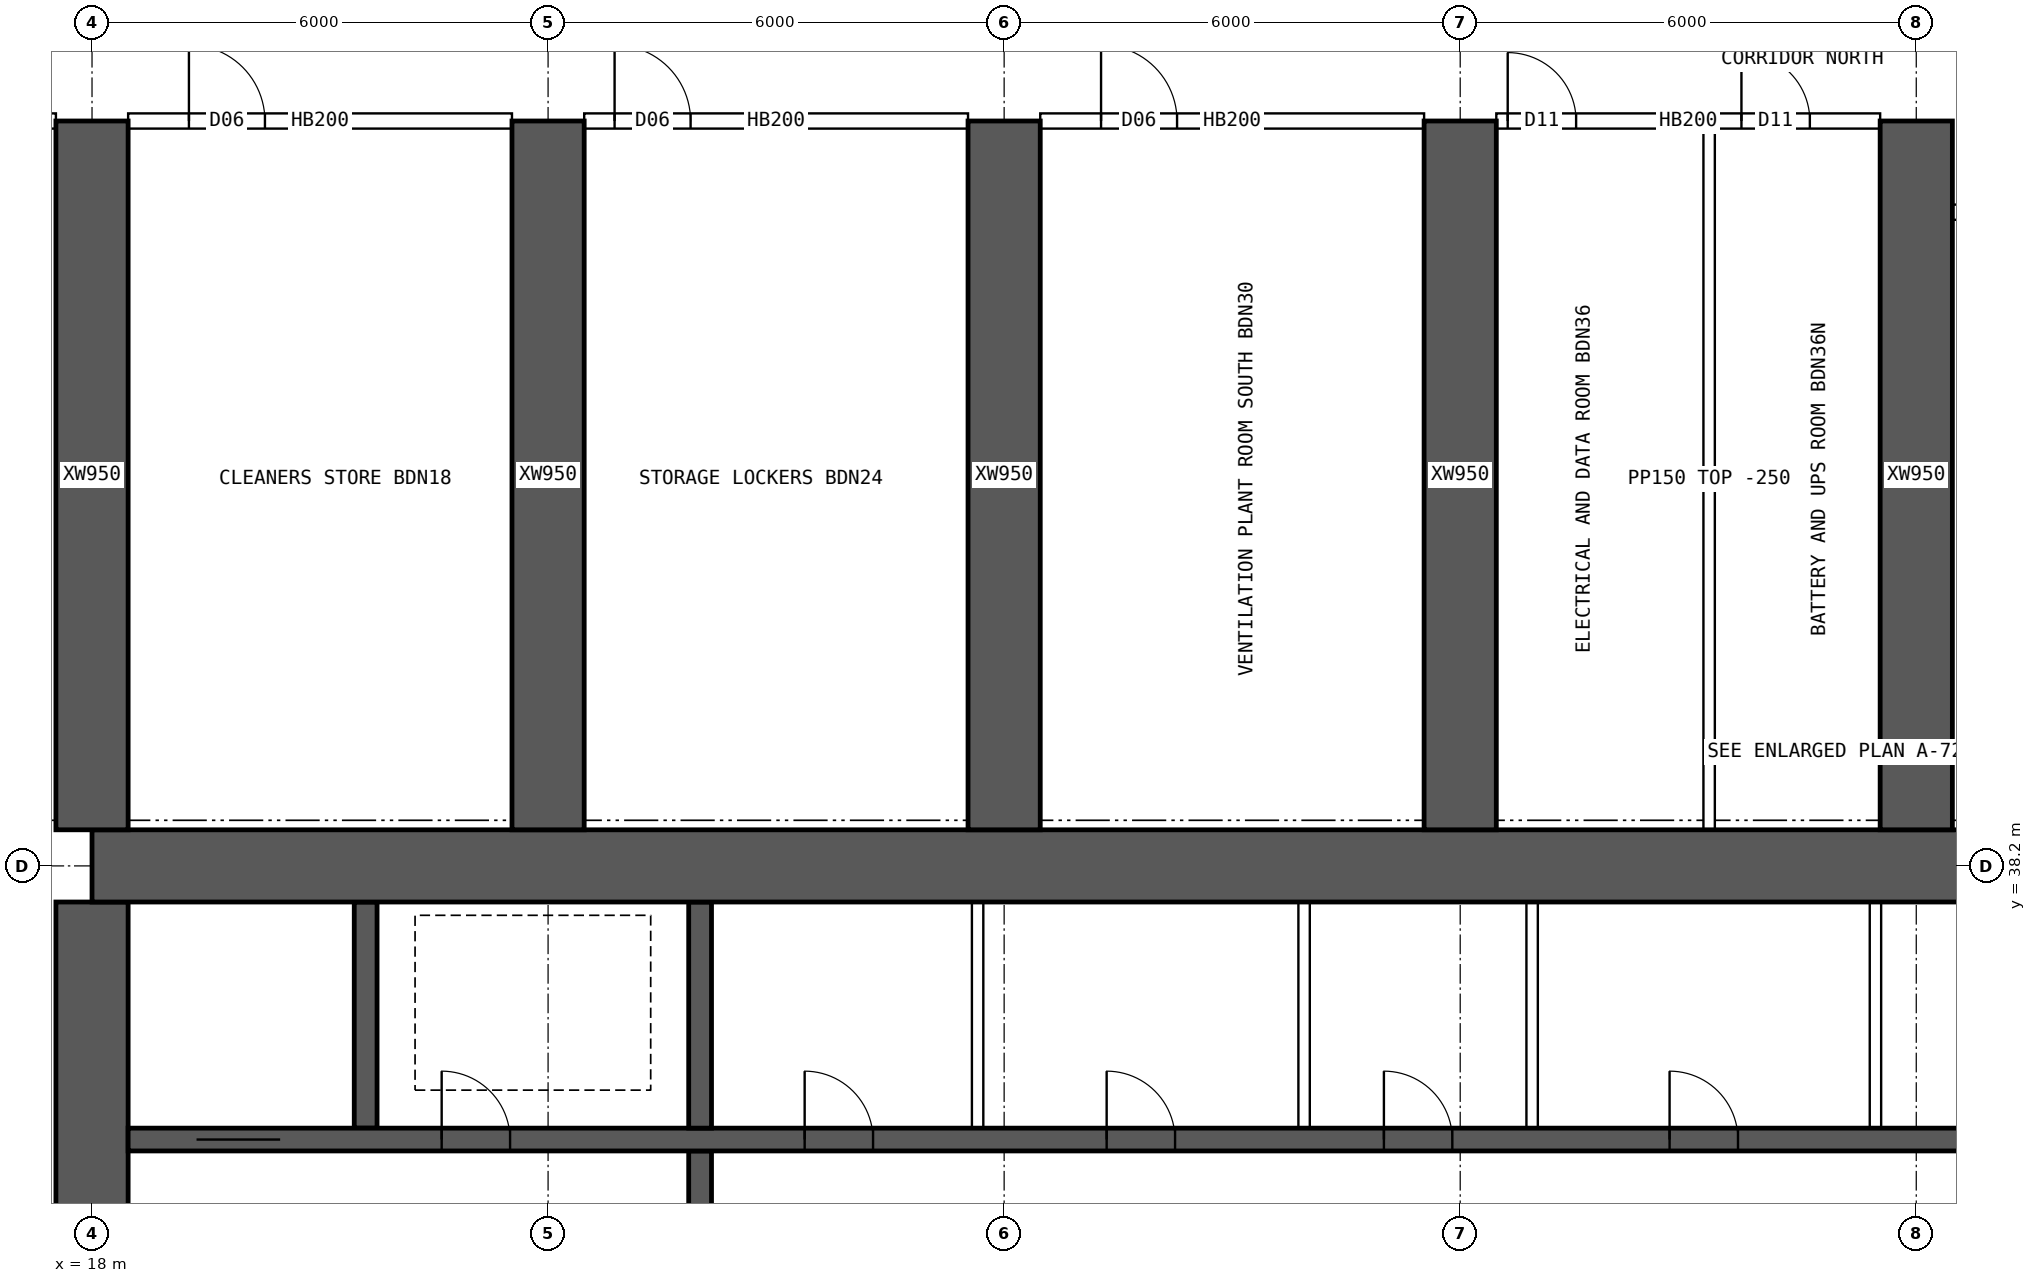
"""IFC4 building model, lengths in metres.
Left out: names, types, materials, properties, quantities, classifications, styles, units other than length and angle.
Written with IfcOpenShell. Run it as: python <this file> out.ifc"""

import sys

from ifc_helpers import new_model, si_unit, direction, frame, frame_2d, origin, place, context, subcontext, project, spatial, rectangle, extrude, element, fill, save


model = new_model("IFC4")
c1 = context("Model", 3, precision=1e-05, world=origin(), true_north=direction((0.0, 1.0)))
c2 = subcontext(c1, "Body", "Model", "MODEL_VIEW")
j1 = project(units=[si_unit("LENGTHUNIT", "METRE"), si_unit("PLANEANGLEUNIT", "RADIAN")], contexts=[c1])
p1 = place(None, origin())
s1 = spatial("IfcSite", under=j1, at=p1, CompositionType="ELEMENT")
p2 = place(p1, origin())
s2 = spatial("IfcBuilding", under=s1, at=p2, CompositionType="ELEMENT")
p3 = place(p2, frame((0.0, 0.0, 88.15)))
s3 = spatial("IfcBuildingStorey", under=s2, at=p3, CompositionType="ELEMENT", Elevation=88.15)
p4 = place(p3, frame((18.0, 38.2, 0.0), z_axis=(0.0, 0.0, 1.0), x_axis=(1.0, 0.0, 0.0)))
e1 = element("IfcWall", 1, at=p4, inside=s3, PredefinedType="SHEAR", context=c2, shape_type="SweptSolid", body=[
    extrude(rectangle(XDim=48.0, YDim=0.95, at=frame_2d((24.0, 0.0))), origin(), (0.0, 0.0, 1.0), 3.75),
])
p5 = place(p3, frame((18.0, 26.275, 0.0), z_axis=(0.0, 0.0, 1.0), x_axis=(0.0, 1.0, 0.0)))
e2 = element("IfcWall", 2, at=p5, inside=s3, PredefinedType="SHEAR", context=c2, shape_type="SweptSolid", body=[
    extrude(rectangle(XDim=11.45, YDim=0.95, at=frame_2d((5.725, 0.0))), origin(), (0.0, 0.0, 1.0), 3.75),
])
p6 = place(p5, frame((5.025, 0.0, 0.0)))
e3 = element("IfcOpeningElement", 3, at=p6, cuts=e2, PredefinedType="OPENING", context=c2, shape_type="SweptSolid", body=[
    extrude(rectangle(XDim=1.2, YDim=2.1, at=frame_2d((0.6, 1.05))), frame((0.0, 0.485, 0.0), z_axis=(0.0, -1.0, 0.0), x_axis=(1.0, 0.0, 0.0)), (0.0, 0.0, 1.0), 0.97),
])
p7 = place(p3, frame((18.475, 34.6, 0.0), z_axis=(0.0, 0.0, 1.0), x_axis=(1.0, 0.0, 0.0)))
e4 = element("IfcWall", 4, at=p7, inside=s3, PredefinedType="SHEAR", context=c2, shape_type="SweptSolid", body=[
    extrude(rectangle(XDim=47.05, YDim=0.3, at=frame_2d((23.525, 0.0))), origin(), (0.0, 0.0, 1.0), 3.75),
])
p8 = place(p7, frame((0.9, 0.0, 0.0)))
e5 = element("IfcOpeningElement", 5, at=p8, cuts=e4, PredefinedType="OPENING", context=c2, shape_type="SweptSolid", body=[
    extrude(rectangle(XDim=1.1, YDim=2.1, at=frame_2d((0.55, 1.05))), frame((0.0, 0.16, 0.0), z_axis=(0.0, -1.0, 0.0), x_axis=(1.0, 0.0, 0.0)), (0.0, 0.0, 1.0), 0.32),
])
p9 = place(p7, frame((45.05, 0.0, 0.0)))
e6 = element("IfcOpeningElement", 6, at=p9, cuts=e4, PredefinedType="OPENING", context=c2, shape_type="SweptSolid", body=[
    extrude(rectangle(XDim=1.1, YDim=2.1, at=frame_2d((0.55, 1.05))), frame((0.0, 0.16, 0.0), z_axis=(0.0, -1.0, 0.0), x_axis=(1.0, 0.0, 0.0)), (0.0, 0.0, 1.0), 0.32),
])
p10 = place(p7, frame((4.125, 0.0, 0.0)))
e7 = element("IfcOpeningElement", 7, at=p10, cuts=e4, PredefinedType="OPENING", context=c2, shape_type="SweptSolid", body=[
    extrude(rectangle(XDim=0.9, YDim=2.1, at=frame_2d((0.45, 1.05))), frame((0.0, 0.16, 0.0), z_axis=(0.0, -1.0, 0.0), x_axis=(1.0, 0.0, 0.0)), (0.0, 0.0, 1.0), 0.32),
])
p11 = place(p7, frame((42.025, 0.0, 0.0)))
e8 = element("IfcOpeningElement", 8, at=p11, cuts=e4, PredefinedType="OPENING", context=c2, shape_type="SweptSolid", body=[
    extrude(rectangle(XDim=0.9, YDim=2.1, at=frame_2d((0.45, 1.05))), frame((0.0, 0.16, 0.0), z_axis=(0.0, -1.0, 0.0), x_axis=(1.0, 0.0, 0.0)), (0.0, 0.0, 1.0), 0.32),
])
p12 = place(p7, frame((8.9, 0.0, 0.0)))
e9 = element("IfcOpeningElement", 9, at=p12, cuts=e4, PredefinedType="OPENING", context=c2, shape_type="SweptSolid", body=[
    extrude(rectangle(XDim=0.9, YDim=2.1, at=frame_2d((0.45, 1.05))), frame((0.0, 0.16, 0.0), z_axis=(0.0, -1.0, 0.0), x_axis=(1.0, 0.0, 0.0)), (0.0, 0.0, 1.0), 0.32),
])
p13 = place(p7, frame((12.874, 0.0, 0.0)))
e10 = element("IfcOpeningElement", 10, at=p13, cuts=e4, PredefinedType="OPENING", context=c2, shape_type="SweptSolid", body=[
    extrude(rectangle(XDim=0.9, YDim=2.1, at=frame_2d((0.45, 1.05))), frame((0.0, 0.16, 0.0), z_axis=(0.0, -1.0, 0.0), x_axis=(1.0, 0.0, 0.0)), (0.0, 0.0, 1.0), 0.32),
])
p14 = place(p7, frame((16.521, 0.0, 0.0)))
e11 = element("IfcOpeningElement", 11, at=p14, cuts=e4, PredefinedType="OPENING", context=c2, shape_type="SweptSolid", body=[
    extrude(rectangle(XDim=0.9, YDim=2.1, at=frame_2d((0.45, 1.05))), frame((0.0, 0.16, 0.0), z_axis=(0.0, -1.0, 0.0), x_axis=(1.0, 0.0, 0.0)), (0.0, 0.0, 1.0), 0.32),
])
p15 = place(p7, frame((20.28, 0.0, 0.0)))
e12 = element("IfcOpeningElement", 12, at=p15, cuts=e4, PredefinedType="OPENING", context=c2, shape_type="SweptSolid", body=[
    extrude(rectangle(XDim=0.9, YDim=2.1, at=frame_2d((0.45, 1.05))), frame((0.0, 0.16, 0.0), z_axis=(0.0, -1.0, 0.0), x_axis=(1.0, 0.0, 0.0)), (0.0, 0.0, 1.0), 0.32),
])
p16 = place(p7, frame((24.686, 0.0, 0.0)))
e13 = element("IfcOpeningElement", 13, at=p16, cuts=e4, PredefinedType="OPENING", context=c2, shape_type="SweptSolid", body=[
    extrude(rectangle(XDim=0.9, YDim=2.1, at=frame_2d((0.45, 1.05))), frame((0.0, 0.16, 0.0), z_axis=(0.0, -1.0, 0.0), x_axis=(1.0, 0.0, 0.0)), (0.0, 0.0, 1.0), 0.32),
])
p17 = place(p7, frame((27.483, 0.0, 0.0)))
e14 = element("IfcOpeningElement", 14, at=p17, cuts=e4, PredefinedType="OPENING", context=c2, shape_type="SweptSolid", body=[
    extrude(rectangle(XDim=0.9, YDim=2.1, at=frame_2d((0.45, 1.05))), frame((0.0, 0.16, 0.0), z_axis=(0.0, -1.0, 0.0), x_axis=(1.0, 0.0, 0.0)), (0.0, 0.0, 1.0), 0.32),
])
p18 = place(p7, frame((33.604, 0.0, 0.0)))
e15 = element("IfcOpeningElement", 15, at=p18, cuts=e4, PredefinedType="OPENING", context=c2, shape_type="SweptSolid", body=[
    extrude(rectangle(XDim=0.9, YDim=2.1, at=frame_2d((0.45, 1.05))), frame((0.0, 0.16, 0.0), z_axis=(0.0, -1.0, 0.0), x_axis=(1.0, 0.0, 0.0)), (0.0, 0.0, 1.0), 0.32),
])
p19 = place(p3, frame((26.0, 30.55, 0.0), z_axis=(0.0, 0.0, 1.0), x_axis=(0.0, 1.0, 0.0)))
e16 = element("IfcWall", 16, at=p19, inside=s3, PredefinedType="SHEAR", context=c2, shape_type="SweptSolid", body=[
    extrude(rectangle(XDim=3.9, YDim=0.3, at=frame_2d((1.95, 0.0))), origin(), (0.0, 0.0, 1.0), 3.75),
])
p20 = place(p19, frame((1.4, 0.0, 0.0)))
e17 = element("IfcOpeningElement", 17, at=p20, cuts=e16, PredefinedType="OPENING", context=c2, shape_type="SweptSolid", body=[
    extrude(rectangle(XDim=1.2, YDim=2.1, at=frame_2d((0.6, 1.05))), frame((0.0, 0.16, 0.0), z_axis=(0.0, -1.0, 0.0), x_axis=(1.0, 0.0, 0.0)), (0.0, 0.0, 1.0), 0.32),
])
for number, where, z_axis, x_axis in (
    (18, (21.6, 34.75, 0.0), (0.0, 0.0, 1.0), (0.0, 1.0, 0.0)),
    (19, (26.0, 34.75, 0.0), (0.0, 0.0, 1.0), (0.0, 1.0, 0.0)),
):
    element("IfcWall", number, at=place(p3, frame(where, z_axis=z_axis, x_axis=x_axis)), inside=s3, PredefinedType="SHEAR", context=c2, shape_type="SweptSolid", body=[
        extrude(rectangle(XDim=2.975, YDim=0.3, at=frame_2d((1.488, 0.0))), origin(), (0.0, 0.0, 1.0), 3.75),
    ])
for number, where, z_axis, x_axis in (
    (20, (18.0, 38.675, 0.0), (0.0, 0.0, 1.0), (0.0, 1.0, 0.0)),
    (21, (24.0, 38.675, 0.0), (0.0, 0.0, 1.0), (0.0, 1.0, 0.0)),
    (22, (30.0, 38.675, 0.0), (0.0, 0.0, 1.0), (0.0, 1.0, 0.0)),
    (23, (36.0, 38.675, 0.0), (0.0, 0.0, 1.0), (0.0, 1.0, 0.0)),
    (24, (42.0, 38.675, 0.0), (0.0, 0.0, 1.0), (0.0, 1.0, 0.0)),
):
    element("IfcWall", number, at=place(p3, frame(where, z_axis=z_axis, x_axis=x_axis)), inside=s3, PredefinedType="SHEAR", context=c2, shape_type="SweptSolid", body=[
        extrude(rectangle(XDim=9.325, YDim=0.95, at=frame_2d((4.663, 0.0))), origin(), (0.0, 0.0, 1.0), 3.75),
    ])
for number, where, z_axis, x_axis in (
    (25, (29.651, 34.75, 0.0), (0.0, 0.0, 1.0), (0.0, 1.0, 0.0)),
    (26, (33.946, 34.75, 0.0), (0.0, 0.0, 1.0), (0.0, 1.0, 0.0)),
    (27, (36.946, 34.75, 0.0), (0.0, 0.0, 1.0), (0.0, 1.0, 0.0)),
    (28, (41.463, 34.75, 0.0), (0.0, 0.0, 1.0), (0.0, 1.0, 0.0)),
):
    element("IfcWall", number, at=place(p3, frame(where, z_axis=z_axis, x_axis=x_axis)), inside=s3, PredefinedType="SOLIDWALL", context=c2, shape_type="SweptSolid", body=[
        extrude(rectangle(XDim=2.975, YDim=0.15, at=frame_2d((1.488, 0.0))), origin(), (0.0, 0.0, 1.0), 3.5),
    ])
p21 = place(p3, frame((12.475, 48.0, 0.0), z_axis=(0.0, 0.0, 1.0), x_axis=(1.0, 0.0, 0.0)))
e29 = element("IfcWall", 29, at=p21, inside=s3, PredefinedType="SOLIDWALL", context=c2, shape_type="SweptSolid", body=[
    extrude(rectangle(XDim=5.05, YDim=0.2, at=frame_2d((2.525, 0.0))), origin(), (0.0, 0.0, 1.0), 3.5),
])
p22 = place(p21, frame((3.325, 0.0, 0.0)))
e30 = element("IfcOpeningElement", 30, at=p22, cuts=e29, PredefinedType="OPENING", context=c2, shape_type="SweptSolid", body=[
    extrude(rectangle(XDim=1.6, YDim=2.1, at=frame_2d((0.8, 1.05))), frame((0.0, 0.11, 0.0), z_axis=(0.0, -1.0, 0.0), x_axis=(1.0, 0.0, 0.0)), (0.0, 0.0, 1.0), 0.22),
])
p23 = place(p3, frame((18.475, 48.0, 0.0), z_axis=(0.0, 0.0, 1.0), x_axis=(1.0, 0.0, 0.0)))
e31 = element("IfcWall", 31, at=p23, inside=s3, PredefinedType="SOLIDWALL", context=c2, shape_type="SweptSolid", body=[
    extrude(rectangle(XDim=5.05, YDim=0.2, at=frame_2d((2.525, 0.0))), origin(), (0.0, 0.0, 1.0), 3.5),
])
p24 = place(p23, frame((0.8, 0.0, 0.0)))
e32 = element("IfcOpeningElement", 32, at=p24, cuts=e31, PredefinedType="OPENING", context=c2, shape_type="SweptSolid", body=[
    extrude(rectangle(XDim=1.0, YDim=2.1, at=frame_2d((0.5, 1.05))), frame((0.0, 0.11, 0.0), z_axis=(0.0, -1.0, 0.0), x_axis=(1.0, 0.0, 0.0)), (0.0, 0.0, 1.0), 0.22),
])
p25 = place(p3, frame((24.475, 48.0, 0.0), z_axis=(0.0, 0.0, 1.0), x_axis=(1.0, 0.0, 0.0)))
e33 = element("IfcWall", 33, at=p25, inside=s3, PredefinedType="SOLIDWALL", context=c2, shape_type="SweptSolid", body=[
    extrude(rectangle(XDim=5.05, YDim=0.2, at=frame_2d((2.525, 0.0))), origin(), (0.0, 0.0, 1.0), 3.5),
])
p26 = place(p25, frame((0.4, 0.0, 0.0)))
e34 = element("IfcOpeningElement", 34, at=p26, cuts=e33, PredefinedType="OPENING", context=c2, shape_type="SweptSolid", body=[
    extrude(rectangle(XDim=1.0, YDim=2.1, at=frame_2d((0.5, 1.05))), frame((0.0, 0.11, 0.0), z_axis=(0.0, -1.0, 0.0), x_axis=(1.0, 0.0, 0.0)), (0.0, 0.0, 1.0), 0.22),
])
p27 = place(p3, frame((30.475, 48.0, 0.0), z_axis=(0.0, 0.0, 1.0), x_axis=(1.0, 0.0, 0.0)))
e35 = element("IfcWall", 35, at=p27, inside=s3, PredefinedType="SOLIDWALL", context=c2, shape_type="SweptSolid", body=[
    extrude(rectangle(XDim=5.05, YDim=0.2, at=frame_2d((2.525, 0.0))), origin(), (0.0, 0.0, 1.0), 3.5),
])
p28 = place(p27, frame((0.8, 0.0, 0.0)))
e36 = element("IfcOpeningElement", 36, at=p28, cuts=e35, PredefinedType="OPENING", context=c2, shape_type="SweptSolid", body=[
    extrude(rectangle(XDim=1.0, YDim=2.1, at=frame_2d((0.5, 1.05))), frame((0.0, 0.11, 0.0), z_axis=(0.0, -1.0, 0.0), x_axis=(1.0, 0.0, 0.0)), (0.0, 0.0, 1.0), 0.22),
])
p29 = place(p3, frame((36.475, 48.0, 0.0), z_axis=(0.0, 0.0, 1.0), x_axis=(1.0, 0.0, 0.0)))
e37 = element("IfcWall", 37, at=p29, inside=s3, PredefinedType="SOLIDWALL", context=c2, shape_type="SweptSolid", body=[
    extrude(rectangle(XDim=5.05, YDim=0.2, at=frame_2d((2.525, 0.0))), origin(), (0.0, 0.0, 1.0), 3.5),
])
p30 = place(p29, frame((0.15, 0.0, 0.0)))
e38 = element("IfcOpeningElement", 38, at=p30, cuts=e37, PredefinedType="OPENING", context=c2, shape_type="SweptSolid", body=[
    extrude(rectangle(XDim=0.9, YDim=2.1, at=frame_2d((0.45, 1.05))), frame((0.0, 0.11, 0.0), z_axis=(0.0, -1.0, 0.0), x_axis=(1.0, 0.0, 0.0)), (0.0, 0.0, 1.0), 0.22),
])
p31 = place(p29, frame((3.225, 0.0, 0.0)))
e39 = element("IfcOpeningElement", 39, at=p31, cuts=e37, PredefinedType="OPENING", context=c2, shape_type="SweptSolid", body=[
    extrude(rectangle(XDim=0.9, YDim=2.1, at=frame_2d((0.45, 1.05))), frame((0.0, 0.11, 0.0), z_axis=(0.0, -1.0, 0.0), x_axis=(1.0, 0.0, 0.0)), (0.0, 0.0, 1.0), 0.22),
])
p32 = place(p3, frame((39.275, 38.675, 0.0), z_axis=(0.0, 0.0, 1.0), x_axis=(0.0, 1.0, 0.0)))
e40 = element("IfcWall", 40, at=p32, inside=s3, PredefinedType="PARTITIONING", context=c2, shape_type="SweptSolid", body=[
    extrude(rectangle(XDim=9.225, YDim=0.15, at=frame_2d((4.612, 0.0))), origin(), (0.0, 0.0, 1.0), 3.5),
])
p33 = place(p3, frame((42.475, 46.8, 0.0), z_axis=(0.0, 0.0, 1.0), x_axis=(1.0, 0.0, 0.0)))
e41 = element("IfcWall", 41, at=p33, inside=s3, PredefinedType="SOLIDWALL", context=c2, shape_type="SweptSolid", body=[
    extrude(rectangle(XDim=5.05, YDim=0.2, at=frame_2d((2.525, 0.0))), origin(), (0.0, 0.0, 1.0), 3.5),
])
p34 = place(p33, frame((0.8, 0.0, 0.0)))
e42 = element("IfcOpeningElement", 42, at=p34, cuts=e41, PredefinedType="OPENING", context=c2, shape_type="SweptSolid", body=[
    extrude(rectangle(XDim=1.0, YDim=2.1, at=frame_2d((0.5, 1.05))), frame((0.0, 0.11, 0.0), z_axis=(0.0, -1.0, 0.0), x_axis=(1.0, 0.0, 0.0)), (0.0, 0.0, 1.0), 0.22),
])
p35 = place(p8, origin())
e43 = element("IfcDoor", 43, at=p35, inside=s3, OperationType="DOUBLE_DOOR_SLIDING", PredefinedType="DOOR", context=c2, shape_type="SweptSolid", body=[
    extrude(rectangle(XDim=1.1, YDim=2.1, at=frame_2d((0.55, 1.05))), frame((0.0, 0.025, 0.0), z_axis=(0.0, -1.0, 0.0), x_axis=(1.0, 0.0, 0.0)), (0.0, 0.0, 1.0), 0.05),
])
fill(e5, e43)
p36 = place(p10, origin())
e44 = element("IfcDoor", 44, at=p36, inside=s3, OperationType="SINGLE_SWING_LEFT", PredefinedType="DOOR", context=c2, shape_type="SweptSolid", body=[
    extrude(rectangle(XDim=0.9, YDim=2.1, at=frame_2d((0.45, 1.05))), frame((0.0, 0.025, 0.0), z_axis=(0.0, -1.0, 0.0), x_axis=(1.0, 0.0, 0.0)), (0.0, 0.0, 1.0), 0.05),
])
fill(e7, e44)
p37 = place(p12, origin())
e45 = element("IfcDoor", 45, at=p37, inside=s3, OperationType="SINGLE_SWING_LEFT", PredefinedType="DOOR", context=c2, shape_type="SweptSolid", body=[
    extrude(rectangle(XDim=0.9, YDim=2.1, at=frame_2d((0.45, 1.05))), frame((0.0, 0.025, 0.0), z_axis=(0.0, -1.0, 0.0), x_axis=(1.0, 0.0, 0.0)), (0.0, 0.0, 1.0), 0.05),
])
fill(e9, e45)
p38 = place(p13, origin())
e46 = element("IfcDoor", 46, at=p38, inside=s3, OperationType="SINGLE_SWING_LEFT", PredefinedType="DOOR", context=c2, shape_type="SweptSolid", body=[
    extrude(rectangle(XDim=0.9, YDim=2.1, at=frame_2d((0.45, 1.05))), frame((0.0, 0.025, 0.0), z_axis=(0.0, -1.0, 0.0), x_axis=(1.0, 0.0, 0.0)), (0.0, 0.0, 1.0), 0.05),
])
fill(e10, e46)
p39 = place(p14, origin())
e47 = element("IfcDoor", 47, at=p39, inside=s3, OperationType="SINGLE_SWING_LEFT", PredefinedType="DOOR", context=c2, shape_type="SweptSolid", body=[
    extrude(rectangle(XDim=0.9, YDim=2.1, at=frame_2d((0.45, 1.05))), frame((0.0, 0.025, 0.0), z_axis=(0.0, -1.0, 0.0), x_axis=(1.0, 0.0, 0.0)), (0.0, 0.0, 1.0), 0.05),
])
fill(e11, e47)
p40 = place(p15, origin())
e48 = element("IfcDoor", 48, at=p40, inside=s3, OperationType="SINGLE_SWING_LEFT", PredefinedType="DOOR", context=c2, shape_type="SweptSolid", body=[
    extrude(rectangle(XDim=0.9, YDim=2.1, at=frame_2d((0.45, 1.05))), frame((0.0, 0.025, 0.0), z_axis=(0.0, -1.0, 0.0), x_axis=(1.0, 0.0, 0.0)), (0.0, 0.0, 1.0), 0.05),
])
fill(e12, e48)
p41 = place(p24, origin())
e49 = element("IfcDoor", 49, at=p41, inside=s3, OperationType="SINGLE_SWING_LEFT", PredefinedType="DOOR", context=c2, shape_type="SweptSolid", body=[
    extrude(rectangle(XDim=1.0, YDim=2.1, at=frame_2d((0.5, 1.05))), frame((0.0, 0.025, 0.0), z_axis=(0.0, -1.0, 0.0), x_axis=(1.0, 0.0, 0.0)), (0.0, 0.0, 1.0), 0.05),
])
fill(e32, e49)
p42 = place(p26, origin())
e50 = element("IfcDoor", 50, at=p42, inside=s3, OperationType="SINGLE_SWING_LEFT", PredefinedType="DOOR", context=c2, shape_type="SweptSolid", body=[
    extrude(rectangle(XDim=1.0, YDim=2.1, at=frame_2d((0.5, 1.05))), frame((0.0, 0.025, 0.0), z_axis=(0.0, -1.0, 0.0), x_axis=(1.0, 0.0, 0.0)), (0.0, 0.0, 1.0), 0.05),
])
fill(e34, e50)
p43 = place(p28, origin())
e51 = element("IfcDoor", 51, at=p43, inside=s3, OperationType="SINGLE_SWING_LEFT", PredefinedType="DOOR", context=c2, shape_type="SweptSolid", body=[
    extrude(rectangle(XDim=1.0, YDim=2.1, at=frame_2d((0.5, 1.05))), frame((0.0, 0.025, 0.0), z_axis=(0.0, -1.0, 0.0), x_axis=(1.0, 0.0, 0.0)), (0.0, 0.0, 1.0), 0.05),
])
fill(e36, e51)
p44 = place(p30, origin())
e52 = element("IfcDoor", 52, at=p44, inside=s3, OperationType="SINGLE_SWING_LEFT", PredefinedType="DOOR", context=c2, shape_type="SweptSolid", body=[
    extrude(rectangle(XDim=0.9, YDim=2.1, at=frame_2d((0.45, 1.05))), frame((0.0, 0.025, 0.0), z_axis=(0.0, -1.0, 0.0), x_axis=(1.0, 0.0, 0.0)), (0.0, 0.0, 1.0), 0.05),
])
fill(e38, e52)
p45 = place(p31, origin())
e53 = element("IfcDoor", 53, at=p45, inside=s3, OperationType="SINGLE_SWING_LEFT", PredefinedType="DOOR", context=c2, shape_type="SweptSolid", body=[
    extrude(rectangle(XDim=0.9, YDim=2.1, at=frame_2d((0.45, 1.05))), frame((0.0, 0.025, 0.0), z_axis=(0.0, -1.0, 0.0), x_axis=(1.0, 0.0, 0.0)), (0.0, 0.0, 1.0), 0.05),
])
fill(e39, e53)
save(model, sys.argv[1])
